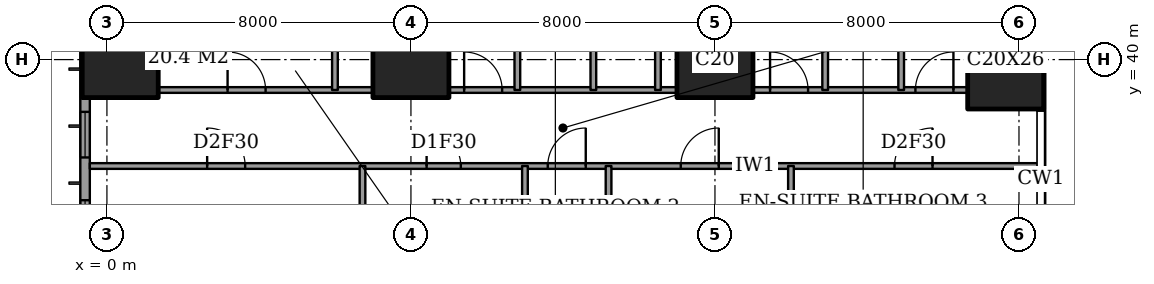
"""IFC4 building model, lengths in metres.
Left out: names, types, materials, properties, quantities, classifications, styles, units other than length and angle.
Written with IfcOpenShell. Run it as: python <this file> out.ifc"""

import sys

from ifc_helpers import new_model, si_unit, direction, frame, frame_2d, origin, origin_2d, place, context, subcontext, project, spatial, rectangle, extrude, element, fill, save


model = new_model("IFC4")
c1 = context("Model", 3, precision=1e-05, world=origin(), true_north=direction((0.0, 1.0)))
c2 = subcontext(c1, "Body", "Model", "MODEL_VIEW")
j1 = project(units=[si_unit("LENGTHUNIT", "METRE"), si_unit("PLANEANGLEUNIT", "RADIAN")], contexts=[c1])
p1 = place(None, origin())
s1 = spatial("IfcSite", under=j1, at=p1, CompositionType="ELEMENT")
p2 = place(p1, origin())
s2 = spatial("IfcBuilding", under=s1, at=p2, CompositionType="ELEMENT")
p3 = place(p2, frame((0.0, 0.0, 107.0)))
s3 = spatial("IfcBuildingStorey", under=s2, at=p3, CompositionType="ELEMENT", Elevation=107.0)
for number, where, z_axis, x_axis in (
    (1, (0.35, 40.0, 0.0), (0.0, 0.0, 1.0), (1.0, 0.0, 0.0)),
    (2, (8.0, 40.0, 0.0), (0.0, 0.0, 1.0), (1.0, 0.0, 0.0)),
    (3, (16.0, 40.0, 0.0), (0.0, 0.0, 1.0), (1.0, 0.0, 0.0)),
):
    element("IfcColumn", number, at=place(p3, frame(where, z_axis=z_axis, x_axis=x_axis)), inside=s3, PredefinedType="COLUMN", context=c2, shape_type="SweptSolid", body=[
        extrude(rectangle(XDim=2.0, YDim=2.0, at=origin_2d()), origin(), (0.0, 0.0, 1.0), 3.6),
    ])
p4 = place(p3, frame((23.65, 40.0, 0.0), z_axis=(0.0, 0.0, 1.0), x_axis=(1.0, 0.0, 0.0)))
e4 = element("IfcColumn", 4, at=p4, inside=s3, PredefinedType="COLUMN", context=c2, shape_type="SweptSolid", body=[
    extrude(rectangle(XDim=2.0, YDim=2.6, at=origin_2d()), origin(), (0.0, 0.0, 1.0), 3.6),
])
p5 = place(p3, frame((-0.575, 44.825, 0.0), z_axis=(0.0, 0.0, 1.0), x_axis=(0.0, -1.0, 0.0)))
e5 = element("IfcWall", 5, at=p5, inside=s3, PredefinedType="SOLIDWALL", context=c2, shape_type="SweptSolid", body=[
    extrude(rectangle(XDim=41.65, YDim=0.25, at=frame_2d((20.825, 0.0))), origin(), (0.0, 0.0, 1.0), 3.6),
])
p6 = place(p5, frame((0.775, 0.0, 0.4)))
e6 = element("IfcOpeningElement", 6, at=p6, cuts=e5, PredefinedType="OPENING", context=c2, shape_type="SweptSolid", body=[
    extrude(rectangle(XDim=2.4, YDim=2.2, at=frame_2d((1.2, 1.1))), frame((0.0, 0.135, 0.0), z_axis=(0.0, -1.0, 0.0), x_axis=(1.0, 0.0, 0.0)), (0.0, 0.0, 1.0), 0.27),
])
p7 = place(p5, frame((6.2, 0.0, 0.4)))
e7 = element("IfcOpeningElement", 7, at=p7, cuts=e5, PredefinedType="OPENING", context=c2, shape_type="SweptSolid", body=[
    extrude(rectangle(XDim=1.2, YDim=2.2, at=frame_2d((0.6, 1.1))), frame((0.0, 0.135, 0.0), z_axis=(0.0, -1.0, 0.0), x_axis=(1.0, 0.0, 0.0)), (0.0, 0.0, 1.0), 0.27),
])
p8 = place(p5, frame((8.525, 0.0, 0.4)))
e8 = element("IfcOpeningElement", 8, at=p8, cuts=e5, PredefinedType="OPENING", context=c2, shape_type="SweptSolid", body=[
    extrude(rectangle(XDim=2.4, YDim=2.2, at=frame_2d((1.2, 1.1))), frame((0.0, 0.135, 0.0), z_axis=(0.0, -1.0, 0.0), x_axis=(1.0, 0.0, 0.0)), (0.0, 0.0, 1.0), 0.27),
])
p9 = place(p5, frame((15.625, 0.0, 0.4)))
e9 = element("IfcOpeningElement", 9, at=p9, cuts=e5, PredefinedType="OPENING", context=c2, shape_type="SweptSolid", body=[
    extrude(rectangle(XDim=2.4, YDim=2.2, at=frame_2d((1.2, 1.1))), frame((0.0, 0.135, 0.0), z_axis=(0.0, -1.0, 0.0), x_axis=(1.0, 0.0, 0.0)), (0.0, 0.0, 1.0), 0.27),
])
p10 = place(p5, frame((23.625, 0.0, 0.4)))
e10 = element("IfcOpeningElement", 10, at=p10, cuts=e5, PredefinedType="OPENING", context=c2, shape_type="SweptSolid", body=[
    extrude(rectangle(XDim=2.4, YDim=2.2, at=frame_2d((1.2, 1.1))), frame((0.0, 0.135, 0.0), z_axis=(0.0, -1.0, 0.0), x_axis=(1.0, 0.0, 0.0)), (0.0, 0.0, 1.0), 0.27),
])
p11 = place(p5, frame((30.825, 0.0, 0.4)))
e11 = element("IfcOpeningElement", 11, at=p11, cuts=e5, PredefinedType="OPENING", context=c2, shape_type="SweptSolid", body=[
    extrude(rectangle(XDim=2.4, YDim=2.2, at=frame_2d((1.2, 1.1))), frame((0.0, 0.135, 0.0), z_axis=(0.0, -1.0, 0.0), x_axis=(1.0, 0.0, 0.0)), (0.0, 0.0, 1.0), 0.27),
])
p12 = place(p5, frame((34.5, 0.0, 0.4)))
e12 = element("IfcOpeningElement", 12, at=p12, cuts=e5, PredefinedType="OPENING", context=c2, shape_type="SweptSolid", body=[
    extrude(rectangle(XDim=1.2, YDim=2.2, at=frame_2d((0.6, 1.1))), frame((0.0, 0.135, 0.0), z_axis=(0.0, -1.0, 0.0), x_axis=(1.0, 0.0, 0.0)), (0.0, 0.0, 1.0), 0.27),
])
p13 = place(p5, frame((38.475, 0.0, 0.4)))
e13 = element("IfcOpeningElement", 13, at=p13, cuts=e5, PredefinedType="OPENING", context=c2, shape_type="SweptSolid", body=[
    extrude(rectangle(XDim=2.4, YDim=2.2, at=frame_2d((1.2, 1.1))), frame((0.0, 0.135, 0.0), z_axis=(0.0, -1.0, 0.0), x_axis=(1.0, 0.0, 0.0)), (0.0, 0.0, 1.0), 0.27),
])
p14 = place(p3, frame((-0.45, 37.2, 0.0), z_axis=(0.0, 0.0, 1.0), x_axis=(1.0, 0.0, 0.0)))
e14 = element("IfcWall", 14, at=p14, inside=s3, PredefinedType="PARTITIONING", context=c2, shape_type="SweptSolid", body=[
    extrude(rectangle(XDim=25.011, YDim=0.15, at=frame_2d((12.505, 0.0))), origin(), (0.0, 0.0, 1.0), 3.35),
])
p15 = place(p14, frame((12.05, 0.0, 0.0)))
e15 = element("IfcOpeningElement", 15, at=p15, cuts=e14, PredefinedType="OPENING", context=c2, shape_type="SweptSolid", body=[
    extrude(rectangle(XDim=1.0, YDim=2.1, at=frame_2d((0.5, 1.05))), frame((0.0, 0.085, 0.0), z_axis=(0.0, -1.0, 0.0), x_axis=(1.0, 0.0, 0.0)), (0.0, 0.0, 1.0), 0.17),
])
p16 = place(p14, frame((3.087, 0.0, 0.0)))
e16 = element("IfcOpeningElement", 16, at=p16, cuts=e14, PredefinedType="OPENING", context=c2, shape_type="SweptSolid", body=[
    extrude(rectangle(XDim=1.0, YDim=2.1, at=frame_2d((0.5, 1.05))), frame((0.0, 0.085, 0.0), z_axis=(0.0, -1.0, 0.0), x_axis=(1.0, 0.0, 0.0)), (0.0, 0.0, 1.0), 0.17),
])
p17 = place(p14, frame((8.863, 0.0, 0.0)))
e17 = element("IfcOpeningElement", 17, at=p17, cuts=e14, PredefinedType="OPENING", context=c2, shape_type="SweptSolid", body=[
    extrude(rectangle(XDim=0.9, YDim=2.1, at=frame_2d((0.45, 1.05))), frame((0.0, 0.085, 0.0), z_axis=(0.0, -1.0, 0.0), x_axis=(1.0, 0.0, 0.0)), (0.0, 0.0, 1.0), 0.17),
])
p18 = place(p14, frame((15.55, 0.0, 0.0)))
e18 = element("IfcOpeningElement", 18, at=p18, cuts=e14, PredefinedType="OPENING", context=c2, shape_type="SweptSolid", body=[
    extrude(rectangle(XDim=1.0, YDim=2.1, at=frame_2d((0.5, 1.05))), frame((0.0, 0.085, 0.0), z_axis=(0.0, -1.0, 0.0), x_axis=(1.0, 0.0, 0.0)), (0.0, 0.0, 1.0), 0.17),
])
p19 = place(p14, frame((21.175, 0.0, 0.0)))
e19 = element("IfcOpeningElement", 19, at=p19, cuts=e14, PredefinedType="OPENING", context=c2, shape_type="SweptSolid", body=[
    extrude(rectangle(XDim=1.0, YDim=2.1, at=frame_2d((0.5, 1.05))), frame((0.0, 0.085, 0.0), z_axis=(0.0, -1.0, 0.0), x_axis=(1.0, 0.0, 0.0)), (0.0, 0.0, 1.0), 0.17),
])
p20 = place(p3, frame((1.35, 39.2, 0.0), z_axis=(0.0, 0.0, 1.0), x_axis=(1.0, 0.0, 0.0)))
e20 = element("IfcWall", 20, at=p20, inside=s3, PredefinedType="PARTITIONING", context=c2, shape_type="SweptSolid", body=[
    extrude(rectangle(XDim=5.65, YDim=0.15, at=frame_2d((2.825, 0.0))), origin(), (0.0, 0.0, 1.0), 3.35),
])
p21 = place(p20, frame((1.825, 0.0, 0.0)))
e21 = element("IfcOpeningElement", 21, at=p21, cuts=e20, PredefinedType="OPENING", context=c2, shape_type="SweptSolid", body=[
    extrude(rectangle(XDim=1.0, YDim=2.1, at=frame_2d((0.5, 1.05))), frame((0.0, 0.085, 0.0), z_axis=(0.0, -1.0, 0.0), x_axis=(1.0, 0.0, 0.0)), (0.0, 0.0, 1.0), 0.17),
])
p22 = place(p3, frame((9.0, 39.2, 0.0), z_axis=(0.0, 0.0, 1.0), x_axis=(1.0, 0.0, 0.0)))
e22 = element("IfcWall", 22, at=p22, inside=s3, PredefinedType="PARTITIONING", context=c2, shape_type="SweptSolid", body=[
    extrude(rectangle(XDim=6.0, YDim=0.15, at=frame_2d((3.0, 0.0))), origin(), (0.0, 0.0, 1.0), 3.35),
])
p23 = place(p22, frame((0.4, 0.0, 0.0)))
e23 = element("IfcOpeningElement", 23, at=p23, cuts=e22, PredefinedType="OPENING", context=c2, shape_type="SweptSolid", body=[
    extrude(rectangle(XDim=1.0, YDim=2.1, at=frame_2d((0.5, 1.05))), frame((0.0, 0.085, 0.0), z_axis=(0.0, -1.0, 0.0), x_axis=(1.0, 0.0, 0.0)), (0.0, 0.0, 1.0), 0.17),
])
p24 = place(p3, frame((17.0, 39.2, 0.0), z_axis=(0.0, 0.0, 1.0), x_axis=(1.0, 0.0, 0.0)))
e24 = element("IfcWall", 24, at=p24, inside=s3, PredefinedType="PARTITIONING", context=c2, shape_type="SweptSolid", body=[
    extrude(rectangle(XDim=5.65, YDim=0.15, at=frame_2d((2.825, 0.0))), origin(), (0.0, 0.0, 1.0), 3.35),
])
p25 = place(p24, frame((0.45, 0.0, 0.0)))
e25 = element("IfcOpeningElement", 25, at=p25, cuts=e24, PredefinedType="OPENING", context=c2, shape_type="SweptSolid", body=[
    extrude(rectangle(XDim=1.0, YDim=2.1, at=frame_2d((0.5, 1.05))), frame((0.0, 0.085, 0.0), z_axis=(0.0, -1.0, 0.0), x_axis=(1.0, 0.0, 0.0)), (0.0, 0.0, 1.0), 0.17),
])
p26 = place(p24, frame((4.275, 0.0, 0.0)))
e26 = element("IfcOpeningElement", 26, at=p26, cuts=e24, PredefinedType="OPENING", context=c2, shape_type="SweptSolid", body=[
    extrude(rectangle(XDim=1.0, YDim=2.1, at=frame_2d((0.5, 1.05))), frame((0.0, 0.085, 0.0), z_axis=(0.0, -1.0, 0.0), x_axis=(1.0, 0.0, 0.0)), (0.0, 0.0, 1.0), 0.17),
])
p27 = place(p3, frame((6.0, 39.2, 0.0), z_axis=(0.0, 0.0, 1.0), x_axis=(0.0, 1.0, 0.0)))
e27 = element("IfcWall", 27, at=p27, inside=s3, PredefinedType="PARTITIONING", context=c2, shape_type="SweptSolid", body=[
    extrude(rectangle(XDim=9.25, YDim=0.15, at=frame_2d((4.625, 0.0))), origin(), (0.0, 0.0, 1.0), 3.35),
])
p28 = place(p3, frame((6.725, 33.2, 0.0), z_axis=(0.0, 0.0, 1.0), x_axis=(0.0, 1.0, 0.0)))
e28 = element("IfcWall", 28, at=p28, inside=s3, PredefinedType="PARTITIONING", context=c2, shape_type="SweptSolid", body=[
    extrude(rectangle(XDim=4.0, YDim=0.15, at=frame_2d((2.0, 0.0))), origin(), (0.0, 0.0, 1.0), 3.35),
])
p29 = place(p3, frame((10.8, 39.2, 0.0), z_axis=(0.0, 0.0, 1.0), x_axis=(0.0, 1.0, 0.0)))
e29 = element("IfcWall", 29, at=p29, inside=s3, PredefinedType="PARTITIONING", context=c2, shape_type="SweptSolid", body=[
    extrude(rectangle(XDim=3.4, YDim=0.15, at=frame_2d((1.7, 0.0))), origin(), (0.0, 0.0, 1.0), 3.35),
])
p30 = place(p29, frame((1.25, 0.0, 0.0)))
e30 = element("IfcOpeningElement", 30, at=p30, cuts=e29, PredefinedType="OPENING", context=c2, shape_type="SweptSolid", body=[
    extrude(rectangle(XDim=0.9, YDim=2.1, at=frame_2d((0.45, 1.05))), frame((0.0, 0.085, 0.0), z_axis=(0.0, -1.0, 0.0), x_axis=(1.0, 0.0, 0.0)), (0.0, 0.0, 1.0), 0.17),
])
p31 = place(p3, frame((11.0, 28.0, 0.0), z_axis=(0.0, 0.0, 1.0), x_axis=(0.0, 1.0, 0.0)))
e31 = element("IfcWall", 31, at=p31, inside=s3, PredefinedType="PARTITIONING", context=c2, shape_type="SweptSolid", body=[
    extrude(rectangle(XDim=9.2, YDim=0.15, at=frame_2d((4.6, 0.0))), origin(), (0.0, 0.0, 1.0), 3.35),
])
p32 = place(p31, frame((0.837, 0.0, 0.0)))
e32 = element("IfcOpeningElement", 32, at=p32, cuts=e31, PredefinedType="OPENING", context=c2, shape_type="SweptSolid", body=[
    extrude(rectangle(XDim=1.0, YDim=2.1, at=frame_2d((0.5, 1.05))), frame((0.0, 0.085, 0.0), z_axis=(0.0, -1.0, 0.0), x_axis=(1.0, 0.0, 0.0)), (0.0, 0.0, 1.0), 0.17),
])
p33 = place(p3, frame((12.8, 39.2, 0.0), z_axis=(0.0, 0.0, 1.0), x_axis=(0.0, 1.0, 0.0)))
e33 = element("IfcWall", 33, at=p33, inside=s3, PredefinedType="PARTITIONING", context=c2, shape_type="SweptSolid", body=[
    extrude(rectangle(XDim=9.25, YDim=0.15, at=frame_2d((4.625, 0.0))), origin(), (0.0, 0.0, 1.0), 3.35),
])
p34 = place(p33, frame((5.875, 0.0, 0.0)))
e34 = element("IfcOpeningElement", 34, at=p34, cuts=e33, PredefinedType="OPENING", context=c2, shape_type="SweptSolid", body=[
    extrude(rectangle(XDim=0.9, YDim=2.1, at=frame_2d((0.45, 1.05))), frame((0.0, 0.085, 0.0), z_axis=(0.0, -1.0, 0.0), x_axis=(1.0, 0.0, 0.0)), (0.0, 0.0, 1.0), 0.17),
])
p35 = place(p3, frame((13.2, 30.675, 0.0), z_axis=(0.0, 0.0, 1.0), x_axis=(0.0, 1.0, 0.0)))
e35 = element("IfcWall", 35, at=p35, inside=s3, PredefinedType="PARTITIONING", context=c2, shape_type="SweptSolid", body=[
    extrude(rectangle(XDim=6.525, YDim=0.15, at=frame_2d((3.262, 0.0))), origin(), (0.0, 0.0, 1.0), 3.35),
])
p36 = place(p3, frame((14.5, 39.2, 0.0), z_axis=(0.0, 0.0, 1.0), x_axis=(0.0, 1.0, 0.0)))
e36 = element("IfcWall", 36, at=p36, inside=s3, PredefinedType="PARTITIONING", context=c2, shape_type="SweptSolid", body=[
    extrude(rectangle(XDim=9.25, YDim=0.15, at=frame_2d((4.625, 0.0))), origin(), (0.0, 0.0, 1.0), 3.35),
])
p37 = place(p3, frame((18.0, 28.0, 0.0), z_axis=(0.0, 0.0, 1.0), x_axis=(0.0, 1.0, 0.0)))
e37 = element("IfcWall", 37, at=p37, inside=s3, PredefinedType="PARTITIONING", context=c2, shape_type="SweptSolid", body=[
    extrude(rectangle(XDim=9.2, YDim=0.15, at=frame_2d((4.6, 0.0))), origin(), (0.0, 0.0, 1.0), 3.35),
])
p38 = place(p37, frame((0.837, 0.0, 0.0)))
e38 = element("IfcOpeningElement", 38, at=p38, cuts=e37, PredefinedType="OPENING", context=c2, shape_type="SweptSolid", body=[
    extrude(rectangle(XDim=1.0, YDim=2.1, at=frame_2d((0.5, 1.05))), frame((0.0, 0.085, 0.0), z_axis=(0.0, -1.0, 0.0), x_axis=(1.0, 0.0, 0.0)), (0.0, 0.0, 1.0), 0.17),
])
p39 = place(p3, frame((18.9, 39.2, 0.0), z_axis=(0.0, 0.0, 1.0), x_axis=(0.0, 1.0, 0.0)))
e39 = element("IfcWall", 39, at=p39, inside=s3, PredefinedType="PARTITIONING", context=c2, shape_type="SweptSolid", body=[
    extrude(rectangle(XDim=3.7, YDim=0.15, at=frame_2d((1.85, 0.0))), origin(), (0.0, 0.0, 1.0), 3.35),
])
p40 = place(p39, frame((1.4, 0.0, 0.0)))
e40 = element("IfcOpeningElement", 40, at=p40, cuts=e39, PredefinedType="OPENING", context=c2, shape_type="SweptSolid", body=[
    extrude(rectangle(XDim=0.9, YDim=2.1, at=frame_2d((0.45, 1.05))), frame((0.0, 0.085, 0.0), z_axis=(0.0, -1.0, 0.0), x_axis=(1.0, 0.0, 0.0)), (0.0, 0.0, 1.0), 0.17),
])
p41 = place(p3, frame((20.9, 39.2, 0.0), z_axis=(0.0, 0.0, 1.0), x_axis=(0.0, 1.0, 0.0)))
e41 = element("IfcWall", 41, at=p41, inside=s3, PredefinedType="PARTITIONING", context=c2, shape_type="SweptSolid", body=[
    extrude(rectangle(XDim=9.25, YDim=0.15, at=frame_2d((4.625, 0.0))), origin(), (0.0, 0.0, 1.0), 3.35),
])
p42 = place(p7, origin())
e42 = element("IfcWindow", 42, at=p42, inside=s3, PartitioningType="SINGLE_PANEL", PredefinedType="WINDOW", context=c2, shape_type="SweptSolid", body=[
    extrude(rectangle(XDim=1.2, YDim=2.2, at=frame_2d((0.6, 1.1))), frame((0.0, 0.03, 0.0), z_axis=(0.0, -1.0, 0.0), x_axis=(1.0, 0.0, 0.0)), (0.0, 0.0, 1.0), 0.06),
])
fill(e7, e42)
p43 = place(p8, origin())
e43 = element("IfcWindow", 43, at=p43, inside=s3, PartitioningType="SINGLE_PANEL", PredefinedType="WINDOW", context=c2, shape_type="SweptSolid", body=[
    extrude(rectangle(XDim=2.4, YDim=2.2, at=frame_2d((1.2, 1.1))), frame((0.0, 0.03, 0.0), z_axis=(0.0, -1.0, 0.0), x_axis=(1.0, 0.0, 0.0)), (0.0, 0.0, 1.0), 0.06),
])
fill(e8, e43)
p44 = place(p21, origin())
e44 = element("IfcDoor", 44, at=p44, inside=s3, OperationType="SINGLE_SWING_RIGHT", PredefinedType="DOOR", context=c2, shape_type="SweptSolid", body=[
    extrude(rectangle(XDim=1.0, YDim=2.1, at=frame_2d((0.5, 1.05))), frame((0.0, 0.025, 0.0), z_axis=(0.0, -1.0, 0.0), x_axis=(1.0, 0.0, 0.0)), (0.0, 0.0, 1.0), 0.05),
])
fill(e21, e44)
p45 = place(p23, origin())
e45 = element("IfcDoor", 45, at=p45, inside=s3, OperationType="SINGLE_SWING_RIGHT", PredefinedType="DOOR", context=c2, shape_type="SweptSolid", body=[
    extrude(rectangle(XDim=1.0, YDim=2.1, at=frame_2d((0.5, 1.05))), frame((0.0, 0.025, 0.0), z_axis=(0.0, -1.0, 0.0), x_axis=(1.0, 0.0, 0.0)), (0.0, 0.0, 1.0), 0.05),
])
fill(e23, e45)
p46 = place(p25, origin())
e46 = element("IfcDoor", 46, at=p46, inside=s3, OperationType="SINGLE_SWING_RIGHT", PredefinedType="DOOR", context=c2, shape_type="SweptSolid", body=[
    extrude(rectangle(XDim=1.0, YDim=2.1, at=frame_2d((0.5, 1.05))), frame((0.0, 0.025, 0.0), z_axis=(0.0, -1.0, 0.0), x_axis=(1.0, 0.0, 0.0)), (0.0, 0.0, 1.0), 0.05),
])
fill(e25, e46)
p47 = place(p26, origin())
e47 = element("IfcDoor", 47, at=p47, inside=s3, OperationType="SINGLE_SWING_LEFT", PredefinedType="DOOR", context=c2, shape_type="SweptSolid", body=[
    extrude(rectangle(XDim=1.0, YDim=2.1, at=frame_2d((0.5, 1.05))), frame((0.0, 0.025, 0.0), z_axis=(0.0, -1.0, 0.0), x_axis=(1.0, 0.0, 0.0)), (0.0, 0.0, 1.0), 0.05),
])
fill(e26, e47)
p48 = place(p15, origin())
e48 = element("IfcDoor", 48, at=p48, inside=s3, OperationType="SINGLE_SWING_LEFT", PredefinedType="DOOR", context=c2, shape_type="SweptSolid", body=[
    extrude(rectangle(XDim=1.0, YDim=2.1, at=frame_2d((0.5, 1.05))), frame((0.0, 0.025, 0.0), z_axis=(0.0, -1.0, 0.0), x_axis=(1.0, 0.0, 0.0)), (0.0, 0.0, 1.0), 0.05),
])
fill(e15, e48)
p49 = place(p16, origin())
e49 = element("IfcDoor", 49, at=p49, inside=s3, OperationType="SINGLE_SWING_RIGHT", PredefinedType="DOOR", context=c2, shape_type="SweptSolid", body=[
    extrude(rectangle(XDim=1.0, YDim=2.1, at=frame_2d((0.5, 1.05))), frame((0.0, 0.025, 0.0), z_axis=(0.0, -1.0, 0.0), x_axis=(1.0, 0.0, 0.0)), (0.0, 0.0, 1.0), 0.05),
])
fill(e16, e49)
p50 = place(p17, origin())
e50 = element("IfcDoor", 50, at=p50, inside=s3, OperationType="SINGLE_SWING_RIGHT", PredefinedType="DOOR", context=c2, shape_type="SweptSolid", body=[
    extrude(rectangle(XDim=0.9, YDim=2.1, at=frame_2d((0.45, 1.05))), frame((0.0, 0.025, 0.0), z_axis=(0.0, -1.0, 0.0), x_axis=(1.0, 0.0, 0.0)), (0.0, 0.0, 1.0), 0.05),
])
fill(e17, e50)
p51 = place(p18, origin())
e51 = element("IfcDoor", 51, at=p51, inside=s3, OperationType="SINGLE_SWING_LEFT", PredefinedType="DOOR", context=c2, shape_type="SweptSolid", body=[
    extrude(rectangle(XDim=1.0, YDim=2.1, at=frame_2d((0.5, 1.05))), frame((0.0, 0.025, 0.0), z_axis=(0.0, -1.0, 0.0), x_axis=(1.0, 0.0, 0.0)), (0.0, 0.0, 1.0), 0.05),
])
fill(e18, e51)
p52 = place(p19, origin())
e52 = element("IfcDoor", 52, at=p52, inside=s3, OperationType="SINGLE_SWING_LEFT", PredefinedType="DOOR", context=c2, shape_type="SweptSolid", body=[
    extrude(rectangle(XDim=1.0, YDim=2.1, at=frame_2d((0.5, 1.05))), frame((0.0, 0.025, 0.0), z_axis=(0.0, -1.0, 0.0), x_axis=(1.0, 0.0, 0.0)), (0.0, 0.0, 1.0), 0.05),
])
fill(e19, e52)
save(model, sys.argv[1])
